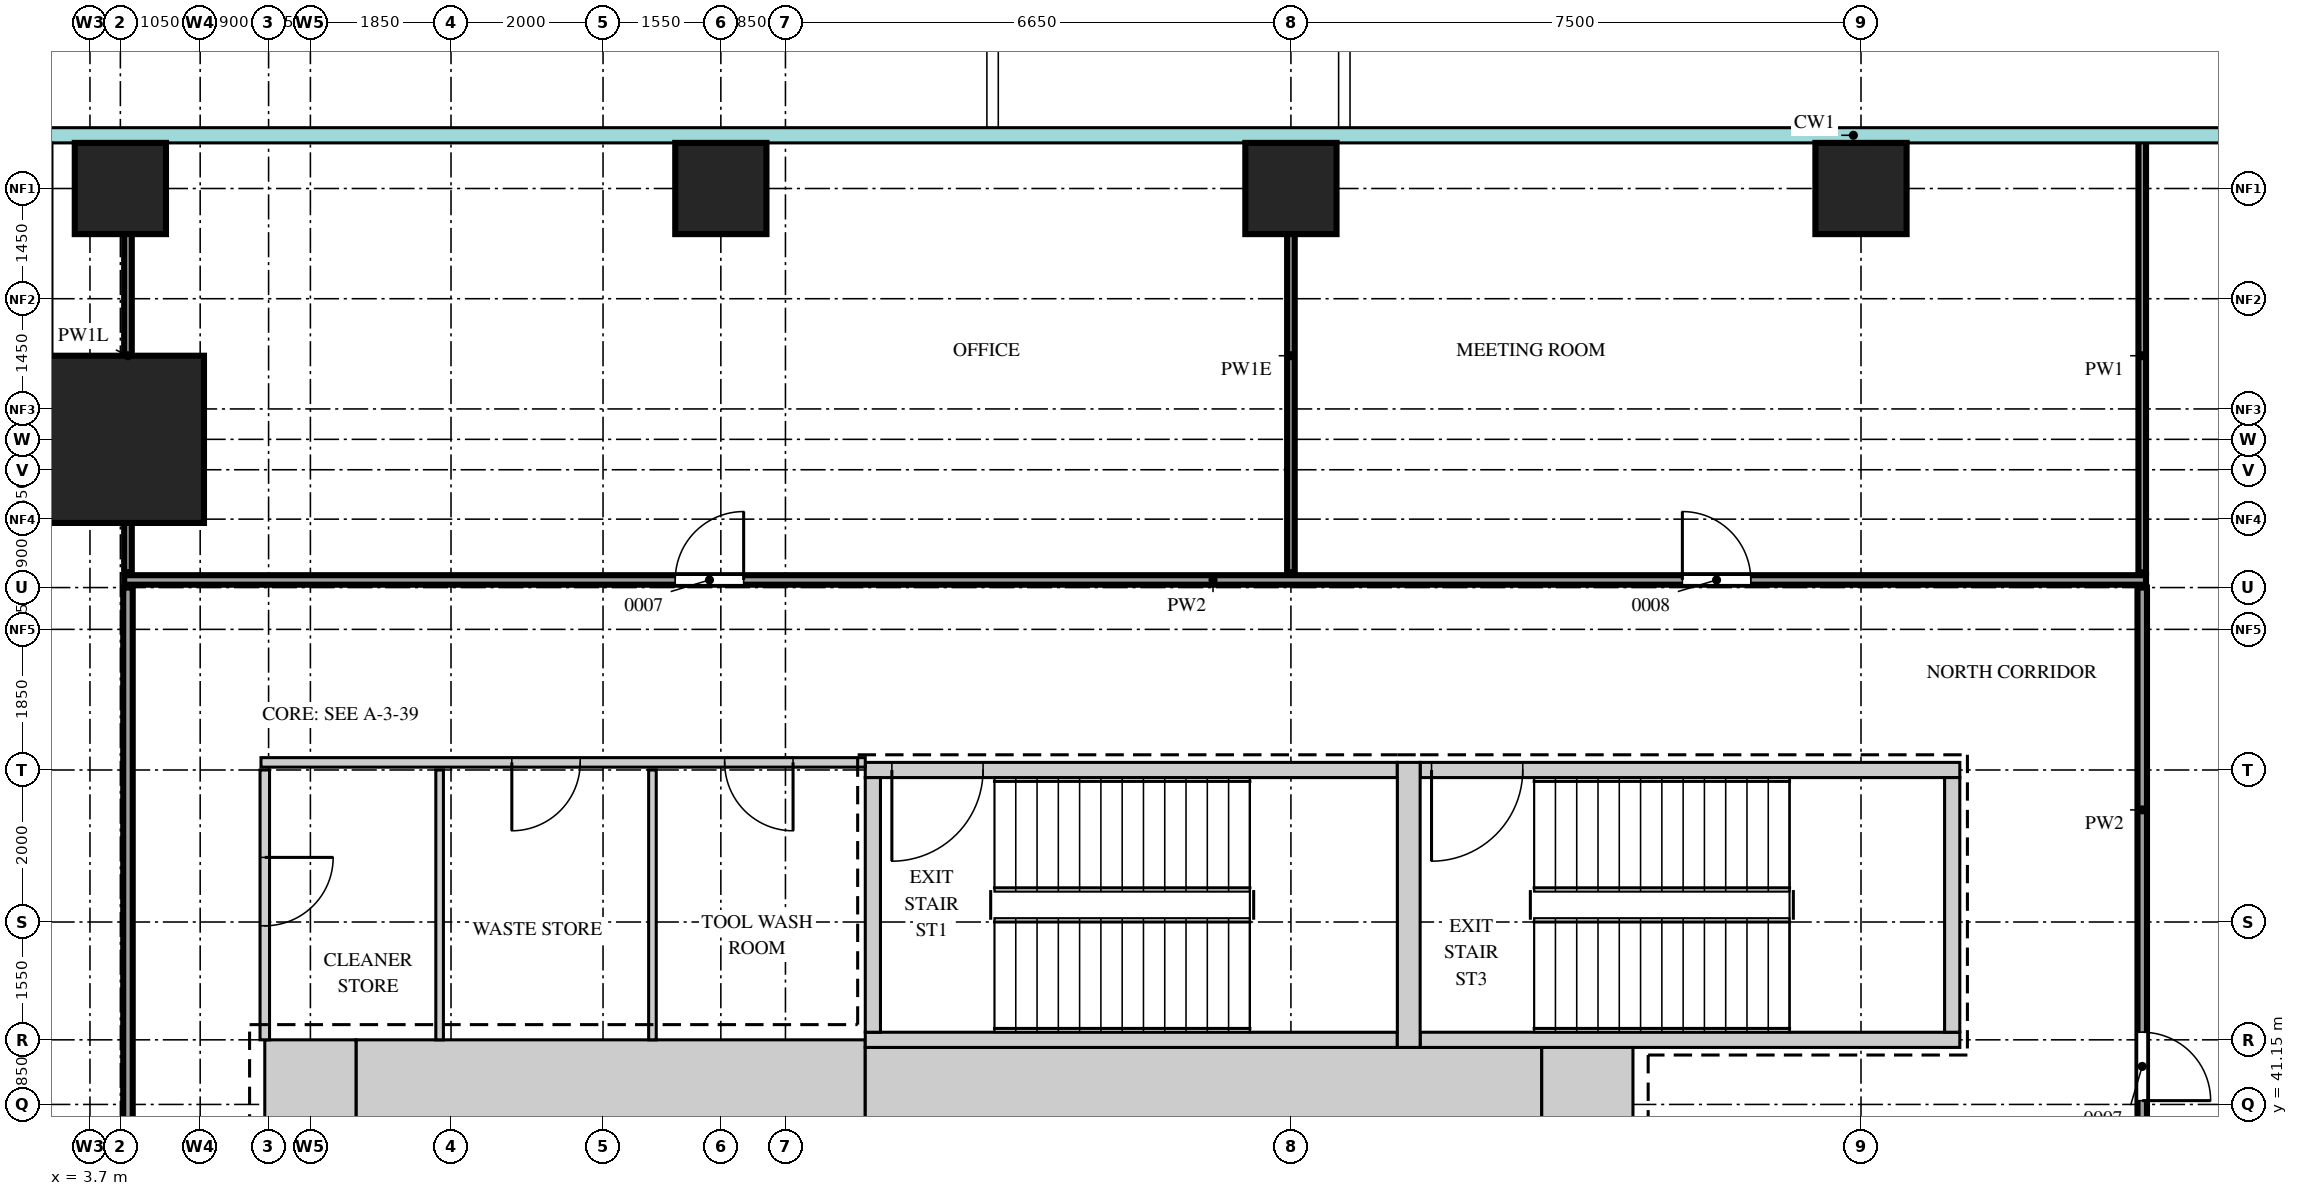
"""IFC4 building model, lengths in metres.
Left out: names, types, materials, properties, quantities, classifications, styles, units other than length and angle.
Written with IfcOpenShell. Run it as: python <this file> out.ifc"""

import sys

from ifc_helpers import new_model, si_unit, direction, frame, frame_2d, origin, origin_2d, place, context, subcontext, project, spatial, rectangle, extrude, source, transform, mapped, element, fill, save


model = new_model("IFC4")
c1 = context("Model", 3, precision=1e-05, world=origin(), true_north=direction((0.0, 1.0)))
c2 = subcontext(c1, "Body", "Model", "MODEL_VIEW")
j1 = project(units=[si_unit("LENGTHUNIT", "METRE"), si_unit("PLANEANGLEUNIT", "RADIAN")], contexts=[c1])
p1 = place(None, origin())
s1 = spatial("IfcSite", under=j1, at=p1, CompositionType="ELEMENT")
p2 = place(p1, origin())
s2 = spatial("IfcBuilding", under=s1, at=p2, CompositionType="ELEMENT")
p3 = place(p2, frame((0.0, 0.0, 64.5)))
s3 = spatial("IfcBuildingStorey", under=s2, at=p3, CompositionType="ELEMENT", Elevation=64.5)
m1 = source(origin(), c2, "Body", "SweptSolid", [
    extrude(rectangle(XDim=6.7, YDim=1.2, at=frame_2d((3.35, 0.0))), origin(), (0.0, 0.0, 1.0), 4.2),
])
p4 = place(p3, frame((7.2, 41.4, 0.0), z_axis=(0.0, 0.0, 1.0), x_axis=(1.0, 0.0, 0.0)))
e1 = element("IfcWall", 1, at=p4, inside=s3, PredefinedType="SHEAR", context=c2, shape_type="MappedRepresentation", body=[
    mapped(m1, transform((0.0, 0.0, 0.0))),
])
m2 = source(origin(), c2, "Body", "SweptSolid", [
    extrude(rectangle(XDim=8.9, YDim=1.1, at=frame_2d((4.45, 0.0))), origin(), (0.0, 0.0, 1.0), 4.2),
])
p5 = place(p3, frame((13.9, 41.35, 0.0), z_axis=(0.0, 0.0, 1.0), x_axis=(1.0, 0.0, 0.0)))
e2 = element("IfcWall", 2, at=p5, inside=s3, PredefinedType="SHEAR", context=c2, shape_type="MappedRepresentation", body=[
    mapped(m2, transform((0.0, 0.0, 0.0))),
])
m3 = source(origin(), c2, "Body", "SweptSolid", [
    extrude(rectangle(XDim=1.2, YDim=1.1, at=frame_2d((0.6, 0.0))), origin(), (0.0, 0.0, 1.0), 4.2),
])
p6 = place(p3, frame((22.8, 41.35, 0.0), z_axis=(0.0, 0.0, 1.0), x_axis=(1.0, 0.0, 0.0)))
e3 = element("IfcWall", 3, at=p6, inside=s3, PredefinedType="SHEAR", context=c2, shape_type="MappedRepresentation", body=[
    mapped(m3, transform((0.0, 0.0, 0.0))),
])
m4 = source(origin(), c2, "Body", "SweptSolid", [
    extrude(rectangle(XDim=1.2, YDim=1.2, at=frame_2d((0.6, 0.0))), origin(), (0.0, 0.0, 1.0), 4.2),
])
p7 = place(p3, frame((6.0, 41.4, 0.0), z_axis=(0.0, 0.0, 1.0), x_axis=(1.0, 0.0, 0.0)))
e4 = element("IfcWall", 4, at=p7, inside=s3, PredefinedType="SHEAR", context=c2, shape_type="MappedRepresentation", body=[
    mapped(m4, transform((0.0, 0.0, 0.0))),
])
m5 = source(origin(), c2, "Body", "SweptSolid", [
    extrude(rectangle(XDim=7.0, YDim=0.2, at=frame_2d((3.5, 0.0))), origin(), (0.0, 0.0, 1.0), 4.2),
])
p8 = place(p3, frame((13.9, 45.55, 0.0), z_axis=(0.0, 0.0, 1.0), x_axis=(1.0, 0.0, 0.0)))
e5 = element("IfcWall", 5, at=p8, inside=s3, PredefinedType="SHEAR", context=c2, shape_type="MappedRepresentation", body=[
    mapped(m5, transform((0.0, 0.0, 0.0))),
])
m6 = source(origin(), c2, "Body", "SweptSolid", [
    extrude(rectangle(XDim=1.2, YDim=2.1, at=frame_2d((0.6, 1.05))), frame((0.0, 0.11, 0.0), z_axis=(0.0, -1.0, 0.0), x_axis=(1.0, 0.0, 0.0)), (0.0, 0.0, 1.0), 0.22),
])
p9 = place(p8, frame((0.35, 0.0, 0.0)))
e6 = element("IfcOpeningElement", 6, at=p9, cuts=e5, PredefinedType="OPENING", context=c2, shape_type="MappedRepresentation", body=[
    mapped(m6, transform((0.0, 0.0, 0.0))),
])
p10 = place(p3, frame((13.9, 42.0, 0.0), z_axis=(0.0, 0.0, 1.0), x_axis=(1.0, 0.0, 0.0)))
e7 = element("IfcWall", 7, at=p10, inside=s3, PredefinedType="SHEAR", context=c2, shape_type="MappedRepresentation", body=[
    mapped(m5, transform((0.0, 0.0, 0.0))),
])
m7 = source(origin(), c2, "Body", "SweptSolid", [
    extrude(rectangle(XDim=7.1, YDim=0.2, at=frame_2d((3.55, 0.0))), origin(), (0.0, 0.0, 1.0), 4.2),
])
p11 = place(p3, frame((21.2, 45.55, 0.0), z_axis=(0.0, 0.0, 1.0), x_axis=(1.0, 0.0, 0.0)))
e8 = element("IfcWall", 8, at=p11, inside=s3, PredefinedType="SHEAR", context=c2, shape_type="MappedRepresentation", body=[
    mapped(m7, transform((0.0, 0.0, 0.0))),
])
p12 = place(p11, frame((0.15, 0.0, 0.0)))
e9 = element("IfcOpeningElement", 9, at=p12, cuts=e8, PredefinedType="OPENING", context=c2, shape_type="MappedRepresentation", body=[
    mapped(m6, transform((0.0, 0.0, 0.0))),
])
p13 = place(p3, frame((21.2, 42.0, 0.0), z_axis=(0.0, 0.0, 1.0), x_axis=(1.0, 0.0, 0.0)))
e10 = element("IfcWall", 10, at=p13, inside=s3, PredefinedType="SHEAR", context=c2, shape_type="MappedRepresentation", body=[
    mapped(m7, transform((0.0, 0.0, 0.0))),
])
m8 = source(origin(), c2, "Body", "SweptSolid", [
    extrude(rectangle(XDim=3.75, YDim=0.3, at=frame_2d((1.875, 0.0))), origin(), (0.0, 0.0, 1.0), 4.2),
])
p14 = place(p3, frame((21.05, 41.9, 0.0), z_axis=(0.0, 0.0, 1.0), x_axis=(0.0, 1.0, 0.0)))
e11 = element("IfcWall", 11, at=p14, inside=s3, PredefinedType="SHEAR", context=c2, shape_type="MappedRepresentation", body=[
    mapped(m8, transform((0.0, 0.0, 0.0))),
])
m9 = source(origin(), c2, "Body", "SweptSolid", [
    extrude(rectangle(XDim=3.35, YDim=0.2, at=frame_2d((1.675, 0.0))), origin(), (0.0, 0.0, 1.0), 4.2),
])
for number, where, z_axis, x_axis in (
    (12, (14.0, 42.1, 0.0), (0.0, 0.0, 1.0), (0.0, 1.0, 0.0)),
    (13, (28.2, 42.1, 0.0), (0.0, 0.0, 1.0), (0.0, 1.0, 0.0)),
):
    element("IfcWall", number, at=place(p3, frame(where, z_axis=z_axis, x_axis=x_axis)), inside=s3, PredefinedType="SHEAR", context=c2, shape_type="MappedRepresentation", body=[
        mapped(m9, transform((0.0, 0.0, 0.0))),
    ])
m10 = source(origin(), c2, "Body", "SweptSolid", [
    extrude(rectangle(XDim=2.2, YDim=2.2, at=origin_2d()), origin(), (0.0, 0.0, 1.0), 4.5),
])
p15 = place(p3, frame((4.1, 49.9, 0.0), z_axis=(0.0, 0.0, 1.0), x_axis=(1.0, 0.0, 0.0)))
e14 = element("IfcColumn", 14, at=p15, inside=s3, PredefinedType="COLUMN", context=c2, shape_type="MappedRepresentation", body=[
    mapped(m10, transform((0.0, 0.0, 0.0))),
])
m11 = source(origin(), c2, "Body", "SweptSolid", [
    extrude(rectangle(XDim=1.2, YDim=1.2, at=origin_2d()), origin(), (0.0, 0.0, 1.0), 4.2),
])
for number, where, z_axis, x_axis in (
    (15, (4.1, 53.2, 0.0), (0.0, 0.0, 1.0), (1.0, 0.0, 0.0)),
    (16, (12.0, 53.2, 0.0), (0.0, 0.0, 1.0), (1.0, 0.0, 0.0)),
    (17, (19.5, 53.2, 0.0), (0.0, 0.0, 1.0), (1.0, 0.0, 0.0)),
    (18, (27.0, 53.2, 0.0), (0.0, 0.0, 1.0), (1.0, 0.0, 0.0)),
):
    element("IfcColumn", number, at=place(p3, frame(where, z_axis=z_axis, x_axis=x_axis)), inside=s3, PredefinedType="COLUMN", context=c2, shape_type="MappedRepresentation", body=[
        mapped(m11, transform((0.0, 0.0, 0.0))),
    ])
m12 = source(origin(), c2, "Body", "SweptSolid", [
    extrude(rectangle(XDim=41.8, YDim=0.125, at=frame_2d((20.9, 0.0))), origin(), (0.0, 0.0, 1.0), 4.3),
])
p16 = place(p3, frame((4.2, 6.15, 0.0), z_axis=(0.0, 0.0, 1.0), x_axis=(0.0, 1.0, 0.0)))
e19 = element("IfcWall", 19, at=p16, inside=s3, PredefinedType="PARTITIONING", context=c2, shape_type="MappedRepresentation", body=[
    mapped(m12, transform((0.0, 0.0, 0.0))),
])
m13 = source(origin(), c2, "Body", "SweptSolid", [
    extrude(rectangle(XDim=0.9, YDim=2.1, at=frame_2d((0.45, 1.05))), frame((0.0, 0.073, 0.0), z_axis=(0.0, -1.0, 0.0), x_axis=(1.0, 0.0, 0.0)), (0.0, 0.0, 1.0), 0.145),
])
p17 = place(p16, frame((6.45, 0.0, 0.0)))
e20 = element("IfcOpeningElement", 20, at=p17, cuts=e19, PredefinedType="OPENING", context=c2, shape_type="MappedRepresentation", body=[
    mapped(m13, transform((0.0, 0.0, 0.0))),
])
m14 = source(origin(), c2, "Body", "SweptSolid", [
    extrude(rectangle(XDim=1.2, YDim=2.1, at=frame_2d((0.6, 1.05))), frame((0.0, 0.073, 0.0), z_axis=(0.0, -1.0, 0.0), x_axis=(1.0, 0.0, 0.0)), (0.0, 0.0, 1.0), 0.145),
])
p18 = place(p16, frame((25.05, 0.0, 0.0)))
e21 = element("IfcOpeningElement", 21, at=p18, cuts=e19, PredefinedType="OPENING", context=c2, shape_type="MappedRepresentation", body=[
    mapped(m14, transform((0.0, 0.0, 0.0))),
])
m15 = source(origin(), c2, "Body", "SweptSolid", [
    extrude(rectangle(XDim=10.15, YDim=0.125, at=frame_2d((5.075, 0.0))), origin(), (0.0, 0.0, 1.0), 4.3),
])
p19 = place(p3, frame((30.7, 37.8, 0.0), z_axis=(0.0, 0.0, 1.0), x_axis=(0.0, 1.0, 0.0)))
e22 = element("IfcWall", 22, at=p19, inside=s3, PredefinedType="PARTITIONING", context=c2, shape_type="MappedRepresentation", body=[
    mapped(m15, transform((0.0, 0.0, 0.0))),
])
p20 = place(p19, frame((3.4, 0.0, 0.0)))
e23 = element("IfcOpeningElement", 23, at=p20, cuts=e22, PredefinedType="OPENING", context=c2, shape_type="MappedRepresentation", body=[
    mapped(m13, transform((0.0, 0.0, 0.0))),
])
m16 = source(origin(), c2, "Body", "SweptSolid", [
    extrude(rectangle(XDim=3.55, YDim=0.125, at=frame_2d((1.775, 0.0))), origin(), (0.0, 0.0, 1.0), 4.3),
])
p21 = place(p3, frame((6.0, 42.0, 0.0), z_axis=(0.0, 0.0, 1.0), x_axis=(0.0, 1.0, 0.0)))
e24 = element("IfcWall", 24, at=p21, inside=s3, PredefinedType="PARTITIONING", context=c2, shape_type="MappedRepresentation", body=[
    mapped(m16, transform((0.0, 0.0, 0.0))),
])
p22 = place(p21, frame((1.5, 0.0, 0.0)))
e25 = element("IfcOpeningElement", 25, at=p22, cuts=e24, PredefinedType="OPENING", context=c2, shape_type="MappedRepresentation", body=[
    mapped(m13, transform((0.0, 0.0, 0.0))),
])
m17 = source(origin(), c2, "Body", "SweptSolid", [
    extrude(rectangle(XDim=3.55, YDim=0.1, at=frame_2d((1.775, 0.0))), origin(), (0.0, 0.0, 1.0), 4.3),
])
for number, where, z_axis, x_axis in (
    (26, (8.3, 42.0, 0.0), (0.0, 0.0, 1.0), (0.0, 1.0, 0.0)),
    (27, (11.1, 42.0, 0.0), (0.0, 0.0, 1.0), (0.0, 1.0, 0.0)),
):
    element("IfcWall", number, at=place(p3, frame(where, z_axis=z_axis, x_axis=x_axis)), inside=s3, PredefinedType="PARTITIONING", context=c2, shape_type="MappedRepresentation", body=[
        mapped(m17, transform((0.0, 0.0, 0.0))),
    ])
m18 = source(origin(), c2, "Body", "SweptSolid", [
    extrude(rectangle(XDim=7.95, YDim=0.125, at=frame_2d((3.975, 0.0))), origin(), (0.0, 0.0, 1.0), 4.3),
])
p23 = place(p3, frame((5.95, 45.65, 0.0), z_axis=(0.0, 0.0, 1.0), x_axis=(1.0, 0.0, 0.0)))
e28 = element("IfcWall", 28, at=p23, inside=s3, PredefinedType="PARTITIONING", context=c2, shape_type="MappedRepresentation", body=[
    mapped(m18, transform((0.0, 0.0, 0.0))),
])
p24 = place(p23, frame((3.3, 0.0, 0.0)))
e29 = element("IfcOpeningElement", 29, at=p24, cuts=e28, PredefinedType="OPENING", context=c2, shape_type="MappedRepresentation", body=[
    mapped(m13, transform((0.0, 0.0, 0.0))),
])
p25 = place(p23, frame((6.1, 0.0, 0.0)))
e30 = element("IfcOpeningElement", 30, at=p25, cuts=e28, PredefinedType="OPENING", context=c2, shape_type="MappedRepresentation", body=[
    mapped(m13, transform((0.0, 0.0, 0.0))),
])
m19 = source(origin(), c2, "Body", "SweptSolid", [
    extrude(rectangle(XDim=26.6, YDim=0.125, at=frame_2d((13.3, 0.0))), origin(), (0.0, 0.0, 1.0), 4.3),
])
p26 = place(p3, frame((4.15, 48.05, 0.0), z_axis=(0.0, 0.0, 1.0), x_axis=(1.0, 0.0, 0.0)))
e31 = element("IfcWall", 31, at=p26, inside=s3, PredefinedType="PARTITIONING", context=c2, shape_type="MappedRepresentation", body=[
    mapped(m19, transform((0.0, 0.0, 0.0))),
])
p27 = place(p26, frame((7.25, 0.0, 0.0)))
e32 = element("IfcOpeningElement", 32, at=p27, cuts=e31, PredefinedType="OPENING", context=c2, shape_type="MappedRepresentation", body=[
    mapped(m13, transform((0.0, 0.0, 0.0))),
])
p28 = place(p26, frame((20.5, 0.0, 0.0)))
e33 = element("IfcOpeningElement", 33, at=p28, cuts=e31, PredefinedType="OPENING", context=c2, shape_type="MappedRepresentation", body=[
    mapped(m13, transform((0.0, 0.0, 0.0))),
])
m20 = source(origin(), c2, "Body", "SweptSolid", [
    extrude(rectangle(XDim=5.7, YDim=0.1, at=frame_2d((2.85, 0.0))), origin(), (0.0, 0.0, 1.0), 3.6),
])
p29 = place(p3, frame((4.2, 48.15, 0.0), z_axis=(0.0, 0.0, 1.0), x_axis=(0.0, 1.0, 0.0)))
e34 = element("IfcWall", 34, at=p29, inside=s3, PredefinedType="PARTITIONING", context=c2, shape_type="MappedRepresentation", body=[
    mapped(m20, transform((0.0, 0.0, 0.0))),
])
m21 = source(origin(), c2, "Body", "SweptSolid", [
    extrude(rectangle(XDim=5.7, YDim=0.1, at=frame_2d((2.85, 0.0))), origin(), (0.0, 0.0, 1.0), 3.84),
])
p30 = place(p3, frame((19.5, 48.15, 0.0), z_axis=(0.0, 0.0, 1.0), x_axis=(0.0, 1.0, 0.0)))
e35 = element("IfcWall", 35, at=p30, inside=s3, PredefinedType="PARTITIONING", context=c2, shape_type="MappedRepresentation", body=[
    mapped(m21, transform((0.0, 0.0, 0.0))),
])
m22 = source(origin(), c2, "Body", "SweptSolid", [
    extrude(rectangle(XDim=5.7, YDim=0.1, at=frame_2d((2.85, 0.0))), origin(), (0.0, 0.0, 1.0), 4.3),
])
p31 = place(p3, frame((30.7, 48.15, 0.0), z_axis=(0.0, 0.0, 1.0), x_axis=(0.0, 1.0, 0.0)))
e36 = element("IfcWall", 36, at=p31, inside=s3, PredefinedType="PARTITIONING", context=c2, shape_type="MappedRepresentation", body=[
    mapped(m22, transform((0.0, 0.0, 0.0))),
])
m23 = source(origin(), c2, "Body", "SweptSolid", [
    extrude(rectangle(XDim=0.9, YDim=2.1, at=frame_2d((0.45, 1.05))), frame((0.0, 0.025, 0.0), z_axis=(0.0, -1.0, 0.0), x_axis=(1.0, 0.0, 0.0)), (0.0, 0.0, 1.0), 0.05),
])
p32 = place(p20, origin())
e37 = element("IfcDoor", 37, at=p32, inside=s3, OperationType="SINGLE_SWING_LEFT", PredefinedType="DOOR", context=c2, shape_type="MappedRepresentation", body=[
    mapped(m23, transform((0.0, 0.0, 0.0))),
])
fill(e23, e37)
p33 = place(p27, origin())
e38 = element("IfcDoor", 38, at=p33, inside=s3, OperationType="SINGLE_SWING_LEFT", PredefinedType="DOOR", context=c2, shape_type="MappedRepresentation", body=[
    mapped(m23, transform((0.0, 0.0, 0.0))),
])
fill(e32, e38)
p34 = place(p28, origin())
e39 = element("IfcDoor", 39, at=p34, inside=s3, OperationType="SINGLE_SWING_RIGHT", PredefinedType="DOOR", context=c2, shape_type="MappedRepresentation", body=[
    mapped(m23, transform((0.0, 0.0, 0.0))),
])
fill(e33, e39)
p35 = place(p22, origin())
e40 = element("IfcDoor", 40, at=p35, inside=s3, OperationType="SINGLE_SWING_RIGHT", PredefinedType="DOOR", context=c2, shape_type="MappedRepresentation", body=[
    mapped(m23, transform((0.0, 0.0, 0.0))),
])
fill(e25, e40)
p36 = place(p24, origin())
e41 = element("IfcDoor", 41, at=p36, inside=s3, OperationType="SINGLE_SWING_LEFT", PredefinedType="DOOR", context=c2, shape_type="MappedRepresentation", body=[
    mapped(m23, transform((0.0, 0.0, 0.0))),
])
fill(e29, e41)
p37 = place(p25, origin())
e42 = element("IfcDoor", 42, at=p37, inside=s3, OperationType="SINGLE_SWING_RIGHT", PredefinedType="DOOR", context=c2, shape_type="MappedRepresentation", body=[
    mapped(m23, transform((0.0, 0.0, 0.0))),
])
fill(e30, e42)
m24 = source(origin(), c2, "Body", "SweptSolid", [
    extrude(rectangle(XDim=1.2, YDim=2.1, at=frame_2d((0.6, 1.05))), frame((0.0, 0.025, 0.0), z_axis=(0.0, -1.0, 0.0), x_axis=(1.0, 0.0, 0.0)), (0.0, 0.0, 1.0), 0.05),
])
p38 = place(p9, origin())
e43 = element("IfcDoor", 43, at=p38, inside=s3, OperationType="SINGLE_SWING_LEFT", PredefinedType="DOOR", context=c2, shape_type="MappedRepresentation", body=[
    mapped(m24, transform((0.0, 0.0, 0.0))),
])
fill(e6, e43)
p39 = place(p12, origin())
e44 = element("IfcDoor", 44, at=p39, inside=s3, OperationType="SINGLE_SWING_LEFT", PredefinedType="DOOR", context=c2, shape_type="MappedRepresentation", body=[
    mapped(m24, transform((0.0, 0.0, 0.0))),
])
fill(e9, e44)
save(model, sys.argv[1])
